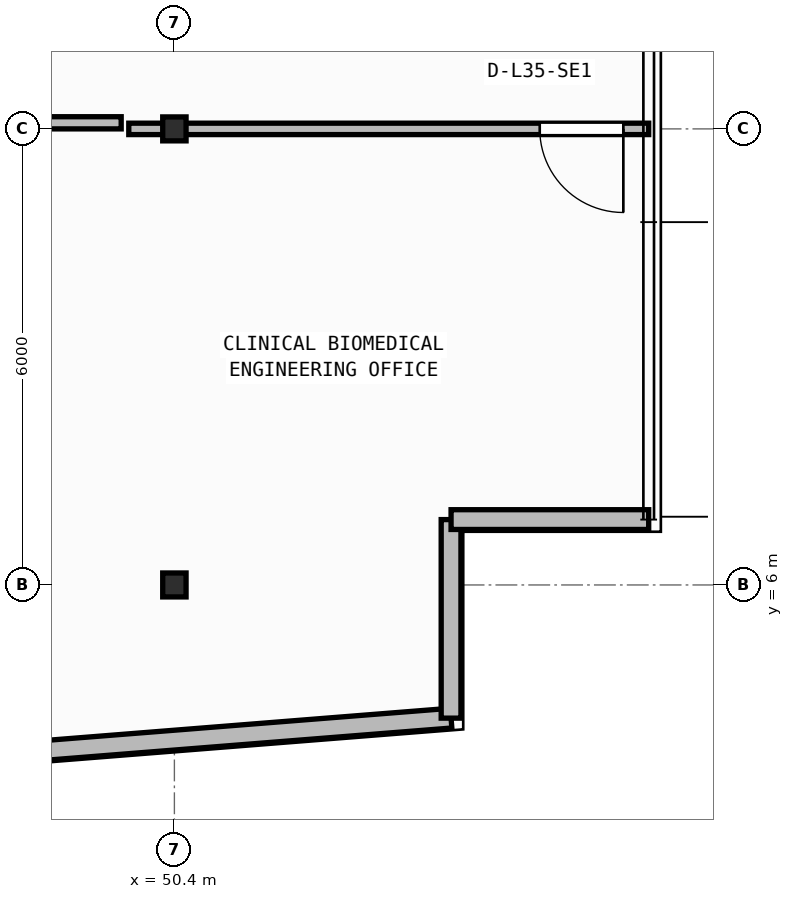
"""IFC4 building model, lengths in metres.
Left out: names, types, materials, properties, quantities, classifications, styles, units other than length and angle.
Written with IfcOpenShell. Run it as: python <this file> out.ifc"""

import sys

from ifc_helpers import new_model, si_unit, direction, frame, frame_2d, origin, origin_2d, place, context, subcontext, project, spatial, rectangle, i_section, extrude, element, fill, save


model = new_model("IFC4")
c1 = context("Model", 3, precision=1e-05, world=origin(), true_north=direction((0.0, 1.0)))
c2 = subcontext(c1, "Body", "Model", "MODEL_VIEW")
j1 = project(units=[si_unit("LENGTHUNIT", "METRE"), si_unit("PLANEANGLEUNIT", "RADIAN")], contexts=[c1])
p1 = place(None, origin())
s1 = spatial("IfcSite", under=j1, at=p1, CompositionType="ELEMENT")
p2 = place(p1, origin())
s2 = spatial("IfcBuilding", under=s1, at=p2, CompositionType="ELEMENT")
p3 = place(p2, frame((0.0, 0.0, 142.85)))
s3 = spatial("IfcBuildingStorey", under=s2, at=p3, CompositionType="ELEMENT", Elevation=142.85)
for number, where, z_axis, x_axis in (
    (1, (50.4, 6.0, 0.0), (0.0, 0.0, 1.0), (1.0, 0.0, 0.0)),
    (2, (50.4, 12.0, 0.0), (0.0, 0.0, 1.0), (1.0, 0.0, 0.0)),
):
    element("IfcColumn", number, at=place(p3, frame(where, z_axis=z_axis, x_axis=x_axis)), inside=s3, PredefinedType="COLUMN", context=c2, shape_type="SweptSolid", body=[
        extrude(i_section(OverallWidth=0.307, OverallDepth=0.315, WebThickness=0.012, FlangeThickness=0.019, FilletRadius=0.017, at=origin_2d()), origin(), (0.0, 0.0, 1.0), 3.95),
    ])
p4 = place(p3, frame((2.76, 0.173, 0.0), z_axis=(0.0, 0.0, 1.0), x_axis=(0.996857931723, 0.079210251617, 0.0)))
e3 = element("IfcWall", 3, at=p4, inside=s3, PredefinedType="STANDARD", context=c2, shape_type="SweptSolid", body=[
    extrude(rectangle(XDim=51.442, YDim=0.26, at=frame_2d((25.721, 0.0))), origin(), (0.0, 0.0, 1.0), 3.71),
])
p5 = place(p4, frame((24.521, 0.0, 0.9)))
e4 = element("IfcOpeningElement", 4, at=p5, cuts=e3, PredefinedType="OPENING", context=c2, shape_type="SweptSolid", body=[
    extrude(rectangle(XDim=2.4, YDim=1.65, at=frame_2d((1.2, 0.825))), frame((0.0, 0.14, 0.0), z_axis=(0.0, -1.0, 0.0), x_axis=(1.0, 0.0, 0.0)), (0.0, 0.0, 1.0), 0.28),
])
p6 = place(p3, frame((54.04, 4.248, 0.0), z_axis=(0.0, 0.0, 1.0), x_axis=(0.0, 1.0, 0.0)))
e5 = element("IfcWall", 5, at=p6, inside=s3, PredefinedType="STANDARD", context=c2, shape_type="SweptSolid", body=[
    extrude(rectangle(XDim=2.612, YDim=0.26, at=frame_2d((1.306, 0.0))), origin(), (0.0, 0.0, 1.0), 3.71),
])
p7 = place(p3, frame((54.04, 6.86, 0.0), z_axis=(0.0, 0.0, 1.0), x_axis=(1.0, 0.0, 0.0)))
e6 = element("IfcWall", 6, at=p7, inside=s3, PredefinedType="STANDARD", context=c2, shape_type="SweptSolid", body=[
    extrude(rectangle(XDim=2.6, YDim=0.26, at=frame_2d((1.3, 0.0))), origin(), (0.0, 0.0, 1.0), 3.71),
])
p8 = place(p3, frame((56.64, 12.0, 0.0), z_axis=(0.0, 0.0, 1.0), x_axis=(-1.0, 0.0, 0.0)))
e7 = element("IfcWall", 7, at=p8, inside=s3, PredefinedType="PARTITIONING", context=c2, shape_type="SweptSolid", body=[
    extrude(rectangle(XDim=6.84, YDim=0.15, at=frame_2d((3.42, 0.0))), origin(), (0.0, 0.0, 1.0), 3.083),
])
p9 = place(p8, frame((0.333, 0.0, 0.0)))
e8 = element("IfcOpeningElement", 8, at=p9, cuts=e7, PredefinedType="OPENING", context=c2, shape_type="SweptSolid", body=[
    extrude(rectangle(XDim=1.1, YDim=2.1, at=frame_2d((0.55, 1.05))), frame((0.0, 0.085, 0.0), z_axis=(0.0, -1.0, 0.0), x_axis=(1.0, 0.0, 0.0)), (0.0, 0.0, 1.0), 0.17),
])
p10 = place(p3, frame((46.689, 12.08, 0.0), z_axis=(0.0, 0.0, 1.0), x_axis=(1.0, 0.0, 0.0)))
e9 = element("IfcWall", 9, at=p10, inside=s3, PredefinedType="PARTITIONING", context=c2, shape_type="SweptSolid", body=[
    extrude(rectangle(XDim=3.011, YDim=0.16, at=frame_2d((1.505, 0.0))), origin(), (0.0, 0.0, 1.0), 3.083),
])
p11 = place(p9, origin())
e10 = element("IfcDoor", 10, at=p11, inside=s3, OperationType="SINGLE_SWING_LEFT", PredefinedType="DOOR", context=c2, shape_type="SweptSolid", body=[
    extrude(rectangle(XDim=1.1, YDim=2.1, at=frame_2d((0.55, 1.05))), frame((0.0, 0.025, 0.0), z_axis=(0.0, -1.0, 0.0), x_axis=(1.0, 0.0, 0.0)), (0.0, 0.0, 1.0), 0.05),
])
fill(e8, e10)
save(model, sys.argv[1])
